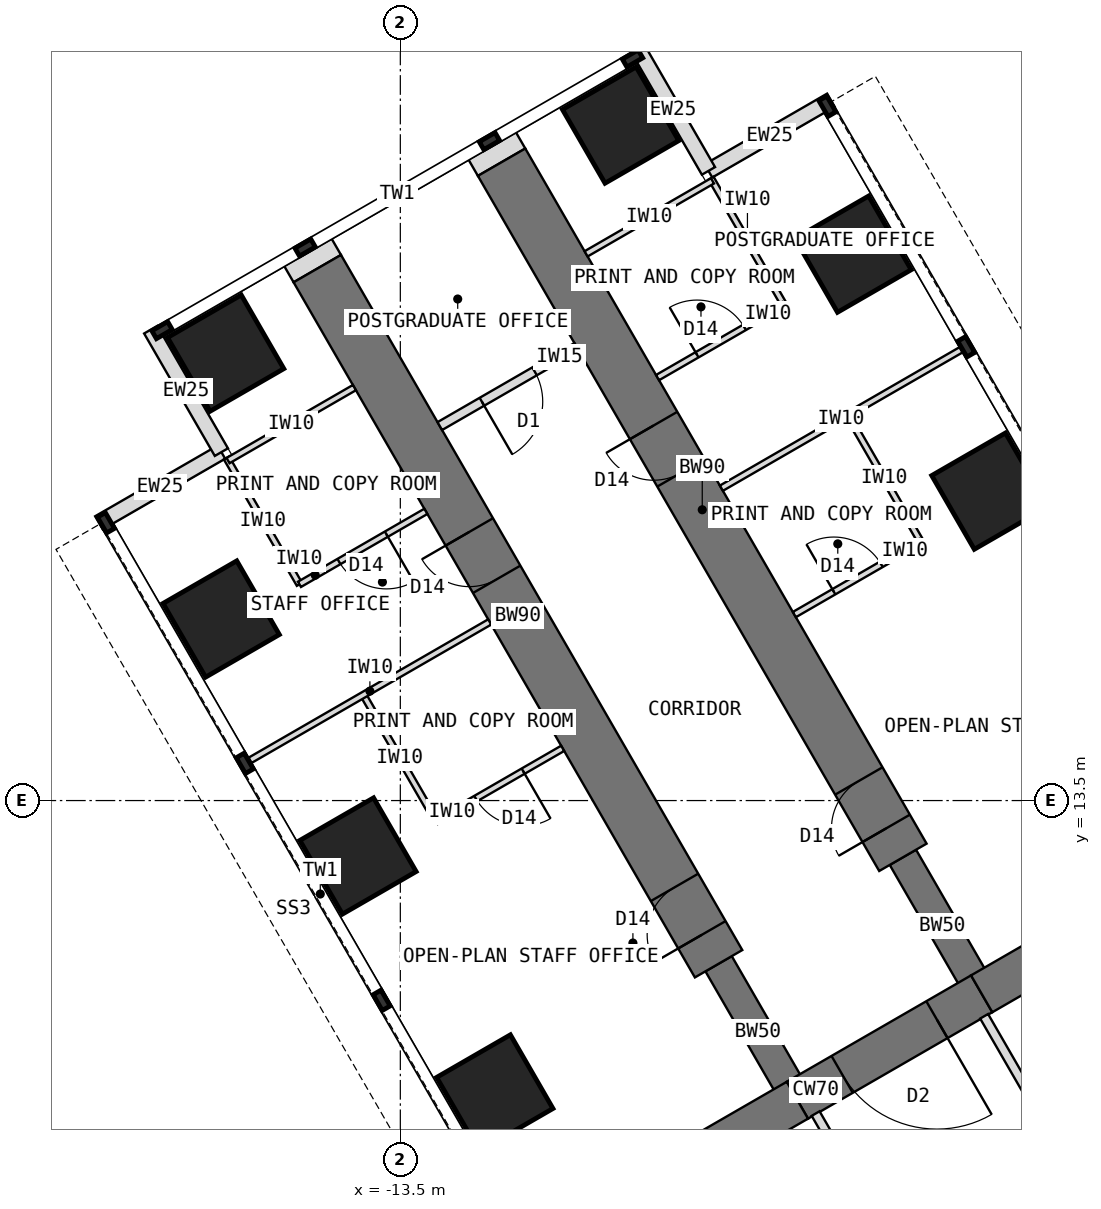
"""IFC4 building model, lengths in metres.
Left out: names, types, materials, properties, quantities, classifications, styles, units other than length and angle.
Written with IfcOpenShell. Run it as: python <this file> out.ifc"""

import sys

from ifc_helpers import new_model, si_unit, direction, frame, frame_2d, origin, origin_2d, place, context, subcontext, project, spatial, rectangle, extrude, element, fill, save


model = new_model("IFC4")
c1 = context("Model", 3, precision=1e-05, world=origin(), true_north=direction((0.0, 1.0)))
c2 = subcontext(c1, "Body", "Model", "MODEL_VIEW")
j1 = project(units=[si_unit("LENGTHUNIT", "METRE"), si_unit("PLANEANGLEUNIT", "RADIAN")], contexts=[c1])
p1 = place(None, origin())
s1 = spatial("IfcSite", under=j1, at=p1, CompositionType="ELEMENT")
p2 = place(p1, origin())
s2 = spatial("IfcBuilding", under=s1, at=p2, CompositionType="ELEMENT")
p3 = place(p2, frame((0.0, 0.0, 76.5)))
s3 = spatial("IfcBuildingStorey", under=s2, at=p3, CompositionType="ELEMENT", Elevation=76.5)
p4 = place(p3, frame((0.0, 12.596, 0.0), z_axis=(0.0, 0.0, 1.0), x_axis=(-0.866011268655, -0.500024481964, 0.0)))
e1 = element("IfcWall", 1, at=p4, inside=s3, PredefinedType="SHEAR", context=c2, shape_type="SweptSolid", body=[
    extrude(rectangle(XDim=4.548, YDim=0.7, at=frame_2d((2.274, 0.0))), origin(), (0.0, 0.0, 1.0), 4.0),
])
p5 = place(p3, frame((-3.939, 10.322, 0.0), z_axis=(0.0, 0.0, 1.0), x_axis=(-0.866019471182, -0.500010275428, 0.0)))
e2 = element("IfcWall", 2, at=p5, inside=s3, PredefinedType="SHEAR", context=c2, shape_type="SweptSolid", body=[
    extrude(rectangle(XDim=3.5, YDim=0.7, at=frame_2d((1.75, 0.0))), origin(), (0.0, 0.0, 1.0), 4.0),
])
p6 = place(p5, frame((0.85, 0.0, 0.0)))
e3 = element("IfcOpeningElement", 3, at=p6, cuts=e2, PredefinedType="OPENING", context=c2, shape_type="SweptSolid", body=[
    extrude(rectangle(XDim=1.8, YDim=2.1, at=frame_2d((0.9, 1.05))), frame((0.0, 0.36, 0.0), z_axis=(0.0, -1.0, 0.0), x_axis=(1.0, 0.0, 0.0)), (0.0, 0.0, 1.0), 0.72),
])
p7 = place(p3, frame((-6.97, 8.572, 0.0), z_axis=(0.0, 0.0, 1.0), x_axis=(-0.866034513004, -0.499984222037, 0.0)))
e4 = element("IfcWall", 4, at=p7, inside=s3, PredefinedType="SHEAR", context=c2, shape_type="SweptSolid", body=[
    extrude(rectangle(XDim=4.548, YDim=0.7, at=frame_2d((2.274, 0.0))), origin(), (0.0, 0.0, 1.0), 4.0),
])
p8 = place(p3, frame((-6.97, 8.572, 0.0), z_axis=(0.0, 0.0, 1.0), x_axis=(-0.499988811324, 0.866031863473, 0.0)))
e5 = element("IfcWall", 5, at=p8, inside=s3, PredefinedType="SHEAR", context=c2, shape_type="SweptSolid", body=[
    extrude(rectangle(XDim=2.592, YDim=0.5, at=frame_2d((1.296, 0.0))), origin(), (0.0, 0.0, 1.0), 4.0),
])
p9 = place(p3, frame((-8.266, 10.816, 0.0), z_axis=(0.0, 0.0, 1.0), x_axis=(-0.499996231654, 0.866027579429, 0.0)))
e6 = element("IfcWall", 6, at=p9, inside=s3, PredefinedType="SHEAR", context=c2, shape_type="SweptSolid", body=[
    extrude(rectangle(XDim=13.2, YDim=0.9, at=frame_2d((6.6, 0.0))), origin(), (0.0, 0.0, 1.0), 4.0),
])
p10 = place(p9, frame((0.55, 0.0, 0.0)))
e7 = element("IfcOpeningElement", 7, at=p10, cuts=e6, PredefinedType="OPENING", context=c2, shape_type="SweptSolid", body=[
    extrude(rectangle(XDim=0.9, YDim=2.1, at=frame_2d((0.45, 1.05))), frame((0.0, 0.46, 0.0), z_axis=(0.0, -1.0, 0.0), x_axis=(1.0, 0.0, 0.0)), (0.0, 0.0, 1.0), 0.92),
])
p11 = place(p9, frame((7.3, 0.0, 0.0)))
e8 = element("IfcOpeningElement", 8, at=p11, cuts=e6, PredefinedType="OPENING", context=c2, shape_type="SweptSolid", body=[
    extrude(rectangle(XDim=0.9, YDim=2.1, at=frame_2d((0.45, 1.05))), frame((0.0, 0.46, 0.0), z_axis=(0.0, -1.0, 0.0), x_axis=(1.0, 0.0, 0.0)), (0.0, 0.0, 1.0), 0.92),
])
p12 = place(p3, frame((-3.939, 10.322, 0.0), z_axis=(0.0, 0.0, 1.0), x_axis=(-0.499918158782, 0.866072649678, 0.0)))
e9 = element("IfcWall", 9, at=p12, inside=s3, PredefinedType="SHEAR", context=c2, shape_type="SweptSolid", body=[
    extrude(rectangle(XDim=2.592, YDim=0.5, at=frame_2d((1.296, 0.0))), origin(), (0.0, 0.0, 1.0), 4.0),
])
p13 = place(p3, frame((-5.234, 12.566, 0.0), z_axis=(0.0, 0.0, 1.0), x_axis=(-0.500010103361, 0.866019570528, 0.0)))
e10 = element("IfcWall", 10, at=p13, inside=s3, PredefinedType="SHEAR", context=c2, shape_type="SweptSolid", body=[
    extrude(rectangle(XDim=13.2, YDim=0.9, at=frame_2d((6.6, 0.0))), origin(), (0.0, 0.0, 1.0), 4.0),
])
p14 = place(p13, frame((0.55, 0.0, 0.0)))
e11 = element("IfcOpeningElement", 11, at=p14, cuts=e10, PredefinedType="OPENING", context=c2, shape_type="SweptSolid", body=[
    extrude(rectangle(XDim=0.9, YDim=2.1, at=frame_2d((0.45, 1.05))), frame((0.0, 0.46, 0.0), z_axis=(0.0, -1.0, 0.0), x_axis=(1.0, 0.0, 0.0)), (0.0, 0.0, 1.0), 0.92),
])
p15 = place(p13, frame((7.3, 0.0, 0.0)))
e12 = element("IfcOpeningElement", 12, at=p15, cuts=e10, PredefinedType="OPENING", context=c2, shape_type="SweptSolid", body=[
    extrude(rectangle(XDim=0.9, YDim=2.1, at=frame_2d((0.45, 1.05))), frame((0.0, 0.46, 0.0), z_axis=(0.0, -1.0, 0.0), x_axis=(1.0, 0.0, 0.0)), (0.0, 0.0, 1.0), 0.92),
])
for number, where, z_axis, x_axis in (
    (13, (-11.946, 8.691, 0.0), (0.0, 0.0, 1.0), (0.866, 0.5, 0.0)),
    (14, (-14.196, 12.588, 0.0), (0.0, 0.0, 1.0), (0.866, 0.5, 0.0)),
    (15, (-3.804, 18.588, 0.0), (0.0, 0.0, 1.0), (0.866, 0.5, 0.0)),
    (16, (-16.446, 16.486, 0.0), (0.0, 0.0, 1.0), (0.866, 0.5, 0.0)),
    (17, (-6.054, 22.486, 0.0), (0.0, 0.0, 1.0), (0.866, 0.5, 0.0)),
    (18, (-16.373, 20.858, 0.0), (0.0, 0.0, 1.0), (0.866, 0.5, 0.0)),
    (19, (-9.877, 24.608, 0.0), (0.0, 0.0, 1.0), (0.866, 0.5, 0.0)),
):
    element("IfcColumn", number, at=place(p3, frame(where, z_axis=z_axis, x_axis=x_axis)), inside=s3, PredefinedType="COLUMN", context=c2, shape_type="SweptSolid", body=[
        extrude(rectangle(XDim=1.4, YDim=1.4, at=origin_2d()), origin(), (0.0, 0.0, 1.0), 4.0),
    ])
for number, where, z_axis, x_axis in (
    (20, (-18.456, 18.067, 0.0), (0.0, 0.0, 1.0), (0.866, 0.5, 0.0)),
    (21, (-16.443, 19.23, 0.0), (0.0, 0.0, 1.0), (-0.5, 0.866, 0.0)),
    (22, (-6.419, 25.017, 0.0), (0.0, 0.0, 1.0), (-0.866, -0.5, 0.0)),
    (23, (-8.432, 23.855, 0.0), (0.0, 0.0, 1.0), (-0.5, 0.866, 0.0)),
):
    element("IfcWall", number, at=place(p3, frame(where, z_axis=z_axis, x_axis=x_axis)), inside=s3, PredefinedType="STANDARD", context=c2, shape_type="SweptSolid", body=[
        extrude(rectangle(XDim=2.325, YDim=0.25, at=frame_2d((1.163, 0.0))), origin(), (0.0, 0.0, 1.0), 3.8),
    ])
for number, where, z_axis, x_axis in (
    (24, (-14.865, 22.248, 0.0), (0.0, 0.0, 1.0), (-0.5, 0.866, 0.0)),
    (25, (-11.834, 23.998, 0.0), (0.0, 0.0, 1.0), (-0.5, 0.866, 0.0)),
):
    element("IfcWall", number, at=place(p3, frame(where, z_axis=z_axis, x_axis=x_axis)), inside=s3, PredefinedType="PARTITIONING", context=c2, shape_type="SweptSolid", body=[
        extrude(rectangle(XDim=0.31, YDim=0.9, at=frame_2d((0.155, 0.0))), origin(), (0.0, 0.0, 1.0), 3.8),
    ])
p16 = place(p3, frame((-12.03, 16.437, 0.0), z_axis=(0.0, 0.0, 1.0), x_axis=(-0.866035472144, -0.499982560684, 0.0)))
e26 = element("IfcWall", 26, at=p16, inside=s3, PredefinedType="PARTITIONING", context=c2, shape_type="SweptSolid", body=[
    extrude(rectangle(XDim=4.55, YDim=0.1, at=frame_2d((2.275, 0.0))), origin(), (0.0, 0.0, 1.0), 3.8),
])
p17 = place(p3, frame((-12.909, 13.158, 0.0), z_axis=(0.0, 0.0, 1.0), x_axis=(-0.499957262057, 0.866050077142, 0.0)))
e27 = element("IfcWall", 27, at=p17, inside=s3, PredefinedType="PARTITIONING", context=c2, shape_type="SweptSolid", body=[
    extrude(rectangle(XDim=2.4, YDim=0.1, at=frame_2d((1.2, 0.0))), origin(), (0.0, 0.0, 1.0), 3.8),
])
p18 = place(p3, frame((-10.83, 14.359, 0.0), z_axis=(0.0, 0.0, 1.0), x_axis=(-0.865980596518, -0.500077600433, 0.0)))
e28 = element("IfcWall", 28, at=p18, inside=s3, PredefinedType="PARTITIONING", context=c2, shape_type="SweptSolid", body=[
    extrude(rectangle(XDim=2.4, YDim=0.1, at=frame_2d((1.2, 0.0))), origin(), (0.0, 0.0, 1.0), 3.8),
])
p19 = place(p18, frame((0.75, 0.0, 0.0)))
e29 = element("IfcOpeningElement", 29, at=p19, cuts=e28, PredefinedType="OPENING", context=c2, shape_type="SweptSolid", body=[
    extrude(rectangle(XDim=0.9, YDim=2.1, at=frame_2d((0.45, 1.05))), frame((0.0, 0.06, 0.0), z_axis=(0.0, -1.0, 0.0), x_axis=(1.0, 0.0, 0.0)), (0.0, 0.0, 1.0), 0.12),
])
p20 = place(p3, frame((-15.159, 17.056, 0.0), z_axis=(0.0, 0.0, 1.0), x_axis=(-0.500001309137, 0.866024647952, 0.0)))
e30 = element("IfcWall", 30, at=p20, inside=s3, PredefinedType="PARTITIONING", context=c2, shape_type="SweptSolid", body=[
    extrude(rectangle(XDim=2.4, YDim=0.1, at=frame_2d((1.2, 0.0))), origin(), (0.0, 0.0, 1.0), 3.8),
])
p21 = place(p3, frame((-13.08, 18.256, 0.0), z_axis=(0.0, 0.0, 1.0), x_axis=(-0.866024647952, -0.500001309137, 0.0)))
e31 = element("IfcWall", 31, at=p21, inside=s3, PredefinedType="PARTITIONING", context=c2, shape_type="SweptSolid", body=[
    extrude(rectangle(XDim=2.4, YDim=0.1, at=frame_2d((1.2, 0.0))), origin(), (0.0, 0.0, 1.0), 3.8),
])
p22 = place(p21, frame((0.75, 0.0, 0.0)))
e32 = element("IfcOpeningElement", 32, at=p22, cuts=e31, PredefinedType="OPENING", context=c2, shape_type="SweptSolid", body=[
    extrude(rectangle(XDim=0.9, YDim=2.1, at=frame_2d((0.45, 1.05))), frame((0.0, 0.06, 0.0), z_axis=(0.0, -1.0, 0.0), x_axis=(1.0, 0.0, 0.0)), (0.0, 0.0, 1.0), 0.12),
])
p23 = place(p3, frame((-14.255, 20.291, 0.0), z_axis=(0.0, 0.0, 1.0), x_axis=(-0.866024647952, -0.500001309137, 0.0)))
e33 = element("IfcWall", 33, at=p23, inside=s3, PredefinedType="PARTITIONING", context=c2, shape_type="SweptSolid", body=[
    extrude(rectangle(XDim=2.4, YDim=0.1, at=frame_2d((1.2, 0.0))), origin(), (0.0, 0.0, 1.0), 3.8),
])
p24 = place(p3, frame((-8.22, 18.637, 0.0), z_axis=(0.0, 0.0, 1.0), x_axis=(0.866012237902, 0.500022803284, 0.0)))
e34 = element("IfcWall", 34, at=p24, inside=s3, PredefinedType="PARTITIONING", context=c2, shape_type="SweptSolid", body=[
    extrude(rectangle(XDim=4.55, YDim=0.1, at=frame_2d((2.275, 0.0))), origin(), (0.0, 0.0, 1.0), 3.8),
])
p25 = place(p3, frame((-4.941, 17.759, 0.0), z_axis=(0.0, 0.0, 1.0), x_axis=(-0.500077600433, 0.865980596518, 0.0)))
e35 = element("IfcWall", 35, at=p25, inside=s3, PredefinedType="PARTITIONING", context=c2, shape_type="SweptSolid", body=[
    extrude(rectangle(XDim=2.4, YDim=0.1, at=frame_2d((1.2, 0.0))), origin(), (0.0, 0.0, 1.0), 3.8),
])
p26 = place(p3, frame((-7.02, 16.559, 0.0), z_axis=(0.0, 0.0, 1.0), x_axis=(0.866050077142, 0.499957262057, 0.0)))
e36 = element("IfcWall", 36, at=p26, inside=s3, PredefinedType="PARTITIONING", context=c2, shape_type="SweptSolid", body=[
    extrude(rectangle(XDim=2.4, YDim=0.1, at=frame_2d((1.2, 0.0))), origin(), (0.0, 0.0, 1.0), 3.8),
])
p27 = place(p26, frame((0.75, 0.0, 0.0)))
e37 = element("IfcOpeningElement", 37, at=p27, cuts=e36, PredefinedType="OPENING", context=c2, shape_type="SweptSolid", body=[
    extrude(rectangle(XDim=0.9, YDim=2.1, at=frame_2d((0.45, 1.05))), frame((0.0, 0.06, 0.0), z_axis=(0.0, -1.0, 0.0), x_axis=(1.0, 0.0, 0.0)), (0.0, 0.0, 1.0), 0.12),
])
p28 = place(p3, frame((-7.191, 21.656, 0.0), z_axis=(0.0, 0.0, 1.0), x_axis=(-0.500077600433, 0.865980596518, 0.0)))
e38 = element("IfcWall", 38, at=p28, inside=s3, PredefinedType="PARTITIONING", context=c2, shape_type="SweptSolid", body=[
    extrude(rectangle(XDim=2.4, YDim=0.1, at=frame_2d((1.2, 0.0))), origin(), (0.0, 0.0, 1.0), 3.8),
])
p29 = place(p3, frame((-9.27, 20.456, 0.0), z_axis=(0.0, 0.0, 1.0), x_axis=(0.866006032174, 0.500033551112, 0.0)))
e39 = element("IfcWall", 39, at=p29, inside=s3, PredefinedType="PARTITIONING", context=c2, shape_type="SweptSolid", body=[
    extrude(rectangle(XDim=2.4, YDim=0.1, at=frame_2d((1.2, 0.0))), origin(), (0.0, 0.0, 1.0), 3.8),
])
p30 = place(p29, frame((0.75, 0.0, 0.0)))
e40 = element("IfcOpeningElement", 40, at=p30, cuts=e39, PredefinedType="OPENING", context=c2, shape_type="SweptSolid", body=[
    extrude(rectangle(XDim=0.9, YDim=2.1, at=frame_2d((0.45, 1.05))), frame((0.0, 0.06, 0.0), z_axis=(0.0, -1.0, 0.0), x_axis=(1.0, 0.0, 0.0)), (0.0, 0.0, 1.0), 0.12),
])
p31 = place(p3, frame((-10.445, 22.491, 0.0), z_axis=(0.0, 0.0, 1.0), x_axis=(0.866006032174, 0.500033551112, 0.0)))
e41 = element("IfcWall", 41, at=p31, inside=s3, PredefinedType="PARTITIONING", context=c2, shape_type="SweptSolid", body=[
    extrude(rectangle(XDim=2.4, YDim=0.1, at=frame_2d((1.2, 0.0))), origin(), (0.0, 0.0, 1.0), 3.8),
])
p32 = place(p3, frame((-4.436, 4.483, 0.0), z_axis=(0.0, 0.0, 1.0), x_axis=(-0.500017246033, 0.866015446554, 0.0)))
e42 = element("IfcWall", 42, at=p32, inside=s3, PredefinedType="PARTITIONING", context=c2, shape_type="SweptSolid", body=[
    extrude(rectangle(XDim=4.469, YDim=0.15, at=frame_2d((2.234, 0.0))), origin(), (0.0, 0.0, 1.0), 3.8),
])
p33 = place(p32, frame((1.744, 0.0, 0.0)))
e43 = element("IfcOpeningElement", 43, at=p33, cuts=e42, PredefinedType="OPENING", context=c2, shape_type="SweptSolid", body=[
    extrude(rectangle(XDim=1.0, YDim=2.1, at=frame_2d((0.5, 1.05))), frame((0.0, 0.085, 0.0), z_axis=(0.0, -1.0, 0.0), x_axis=(1.0, 0.0, 0.0)), (0.0, 0.0, 1.0), 0.17),
])
p34 = place(p3, frame((-3.898, 9.952, 0.0), z_axis=(0.0, 0.0, 1.0), x_axis=(0.499999927604, -0.866025445582, 0.0)))
e44 = element("IfcWall", 44, at=p34, inside=s3, PredefinedType="PARTITIONING", context=c2, shape_type="SweptSolid", body=[
    extrude(rectangle(XDim=4.468, YDim=0.15, at=frame_2d((2.234, 0.0))), origin(), (0.0, 0.0, 1.0), 3.8),
])
p35 = place(p34, frame((1.724, 0.0, 0.0)))
e45 = element("IfcOpeningElement", 45, at=p35, cuts=e44, PredefinedType="OPENING", context=c2, shape_type="SweptSolid", body=[
    extrude(rectangle(XDim=1.0, YDim=2.1, at=frame_2d((0.5, 1.05))), frame((0.0, 0.085, 0.0), z_axis=(0.0, -1.0, 0.0), x_axis=(1.0, 0.0, 0.0)), (0.0, 0.0, 1.0), 0.17),
])
p36 = place(p3, frame((-10.599, 20.958, 0.0), z_axis=(0.0, 0.0, 1.0), x_axis=(-0.866021400173, -0.500006934395, 0.0)))
e46 = element("IfcWall", 46, at=p36, inside=s3, PredefinedType="PARTITIONING", context=c2, shape_type="SweptSolid", body=[
    extrude(rectangle(XDim=2.6, YDim=0.15, at=frame_2d((1.3, 0.0))), origin(), (0.0, 0.0, 1.0), 3.8),
])
p37 = place(p36, frame((0.8, 0.0, 0.0)))
e47 = element("IfcOpeningElement", 47, at=p37, cuts=e46, PredefinedType="OPENING", context=c2, shape_type="SweptSolid", body=[
    extrude(rectangle(XDim=1.0, YDim=2.1, at=frame_2d((0.5, 1.05))), frame((0.0, 0.085, 0.0), z_axis=(0.0, -1.0, 0.0), x_axis=(1.0, 0.0, 0.0)), (0.0, 0.0, 1.0), 0.17),
])
p38 = place(p6, origin())
e48 = element("IfcDoor", 48, at=p38, inside=s3, OperationType="DOUBLE_DOOR_DOUBLE_SWING", PredefinedType="DOOR", context=c2, shape_type="SweptSolid", body=[
    extrude(rectangle(XDim=1.72, YDim=2.06, at=frame_2d((0.9, 1.03))), frame((0.0, 0.025, 0.0), z_axis=(0.0, -1.0, 0.0), x_axis=(1.0, 0.0, 0.0)), (0.0, 0.0, 1.0), 0.05),
    extrude(rectangle(XDim=0.04, YDim=2.1, at=frame_2d((0.02, 1.05))), frame((0.0, 0.35, 0.0), z_axis=(0.0, -1.0, 0.0), x_axis=(1.0, 0.0, 0.0)), (0.0, 0.0, 1.0), 0.699),
    extrude(rectangle(XDim=0.04, YDim=2.1, at=frame_2d((1.78, 1.05))), frame((0.0, 0.35, 0.0), z_axis=(0.0, -1.0, 0.0), x_axis=(1.0, 0.0, 0.0)), (0.0, 0.0, 1.0), 0.699),
    extrude(rectangle(XDim=1.72, YDim=0.04, at=frame_2d((0.9, 2.08))), frame((0.0, 0.35, 0.0), z_axis=(0.0, -1.0, 0.0), x_axis=(1.0, 0.0, 0.0)), (0.0, 0.0, 1.0), 0.699),
])
fill(e3, e48)
p39 = place(p19, origin())
e49 = element("IfcDoor", 49, at=p39, inside=s3, OperationType="SINGLE_SWING_LEFT", PredefinedType="DOOR", context=c2, shape_type="SweptSolid", body=[
    extrude(rectangle(XDim=0.9, YDim=2.1, at=frame_2d((0.45, 1.05))), frame((0.0, 0.025, 0.0), z_axis=(0.0, -1.0, 0.0), x_axis=(1.0, 0.0, 0.0)), (0.0, 0.0, 1.0), 0.05),
])
fill(e29, e49)
p40 = place(p22, origin())
e50 = element("IfcDoor", 50, at=p40, inside=s3, OperationType="SINGLE_SWING_LEFT", PredefinedType="DOOR", context=c2, shape_type="SweptSolid", body=[
    extrude(rectangle(XDim=0.9, YDim=2.1, at=frame_2d((0.45, 1.05))), frame((0.0, 0.025, 0.0), z_axis=(0.0, -1.0, 0.0), x_axis=(1.0, 0.0, 0.0)), (0.0, 0.0, 1.0), 0.05),
])
fill(e32, e50)
p41 = place(p27, origin())
e51 = element("IfcDoor", 51, at=p41, inside=s3, OperationType="SINGLE_SWING_LEFT", PredefinedType="DOOR", context=c2, shape_type="SweptSolid", body=[
    extrude(rectangle(XDim=0.9, YDim=2.1, at=frame_2d((0.45, 1.05))), frame((0.0, 0.025, 0.0), z_axis=(0.0, -1.0, 0.0), x_axis=(1.0, 0.0, 0.0)), (0.0, 0.0, 1.0), 0.05),
])
fill(e37, e51)
p42 = place(p30, origin())
e52 = element("IfcDoor", 52, at=p42, inside=s3, OperationType="SINGLE_SWING_LEFT", PredefinedType="DOOR", context=c2, shape_type="SweptSolid", body=[
    extrude(rectangle(XDim=0.9, YDim=2.1, at=frame_2d((0.45, 1.05))), frame((0.0, 0.025, 0.0), z_axis=(0.0, -1.0, 0.0), x_axis=(1.0, 0.0, 0.0)), (0.0, 0.0, 1.0), 0.05),
])
fill(e40, e52)
p43 = place(p37, origin())
e53 = element("IfcDoor", 53, at=p43, inside=s3, OperationType="SINGLE_SWING_RIGHT", PredefinedType="DOOR", context=c2, shape_type="SweptSolid", body=[
    extrude(rectangle(XDim=1.0, YDim=2.1, at=frame_2d((0.5, 1.05))), frame((0.0, 0.025, 0.0), z_axis=(0.0, -1.0, 0.0), x_axis=(1.0, 0.0, 0.0)), (0.0, 0.0, 1.0), 0.05),
])
fill(e47, e53)
p44 = place(p10, origin())
e54 = element("IfcDoor", 54, at=p44, inside=s3, OperationType="SINGLE_SWING_LEFT", PredefinedType="DOOR", context=c2, shape_type="SweptSolid", body=[
    extrude(rectangle(XDim=0.82, YDim=2.06, at=frame_2d((0.45, 1.03))), frame((0.0, 0.025, 0.0), z_axis=(0.0, -1.0, 0.0), x_axis=(1.0, 0.0, 0.0)), (0.0, 0.0, 1.0), 0.05),
    extrude(rectangle(XDim=0.04, YDim=2.1, at=frame_2d((0.02, 1.05))), frame((0.0, 0.45, 0.0), z_axis=(0.0, -1.0, 0.0), x_axis=(1.0, 0.0, 0.0)), (0.0, 0.0, 1.0), 0.899),
    extrude(rectangle(XDim=0.04, YDim=2.1, at=frame_2d((0.88, 1.05))), frame((0.0, 0.45, 0.0), z_axis=(0.0, -1.0, 0.0), x_axis=(1.0, 0.0, 0.0)), (0.0, 0.0, 1.0), 0.899),
    extrude(rectangle(XDim=0.82, YDim=0.04, at=frame_2d((0.45, 2.08))), frame((0.0, 0.45, 0.0), z_axis=(0.0, -1.0, 0.0), x_axis=(1.0, 0.0, 0.0)), (0.0, 0.0, 1.0), 0.899),
])
fill(e7, e54)
p45 = place(p11, origin())
e55 = element("IfcDoor", 55, at=p45, inside=s3, OperationType="SINGLE_SWING_RIGHT", PredefinedType="DOOR", context=c2, shape_type="SweptSolid", body=[
    extrude(rectangle(XDim=0.82, YDim=2.06, at=frame_2d((0.45, 1.03))), frame((0.0, 0.025, 0.0), z_axis=(0.0, -1.0, 0.0), x_axis=(1.0, 0.0, 0.0)), (0.0, 0.0, 1.0), 0.05),
    extrude(rectangle(XDim=0.04, YDim=2.1, at=frame_2d((0.02, 1.05))), frame((0.0, 0.45, 0.0), z_axis=(0.0, -1.0, 0.0), x_axis=(1.0, 0.0, 0.0)), (0.0, 0.0, 1.0), 0.899),
    extrude(rectangle(XDim=0.04, YDim=2.1, at=frame_2d((0.88, 1.05))), frame((0.0, 0.45, 0.0), z_axis=(0.0, -1.0, 0.0), x_axis=(1.0, 0.0, 0.0)), (0.0, 0.0, 1.0), 0.899),
    extrude(rectangle(XDim=0.82, YDim=0.04, at=frame_2d((0.45, 2.08))), frame((0.0, 0.45, 0.0), z_axis=(0.0, -1.0, 0.0), x_axis=(1.0, 0.0, 0.0)), (0.0, 0.0, 1.0), 0.899),
])
fill(e8, e55)
p46 = place(p14, origin())
e56 = element("IfcDoor", 56, at=p46, inside=s3, OperationType="SINGLE_SWING_LEFT", PredefinedType="DOOR", context=c2, shape_type="SweptSolid", body=[
    extrude(rectangle(XDim=0.82, YDim=2.06, at=frame_2d((0.45, 1.03))), frame((0.0, 0.025, 0.0), z_axis=(0.0, -1.0, 0.0), x_axis=(1.0, 0.0, 0.0)), (0.0, 0.0, 1.0), 0.05),
    extrude(rectangle(XDim=0.04, YDim=2.1, at=frame_2d((0.02, 1.05))), frame((0.0, 0.45, 0.0), z_axis=(0.0, -1.0, 0.0), x_axis=(1.0, 0.0, 0.0)), (0.0, 0.0, 1.0), 0.899),
    extrude(rectangle(XDim=0.04, YDim=2.1, at=frame_2d((0.88, 1.05))), frame((0.0, 0.45, 0.0), z_axis=(0.0, -1.0, 0.0), x_axis=(1.0, 0.0, 0.0)), (0.0, 0.0, 1.0), 0.899),
    extrude(rectangle(XDim=0.82, YDim=0.04, at=frame_2d((0.45, 2.08))), frame((0.0, 0.45, 0.0), z_axis=(0.0, -1.0, 0.0), x_axis=(1.0, 0.0, 0.0)), (0.0, 0.0, 1.0), 0.899),
])
fill(e11, e56)
p47 = place(p15, origin())
e57 = element("IfcDoor", 57, at=p47, inside=s3, OperationType="SINGLE_SWING_RIGHT", PredefinedType="DOOR", context=c2, shape_type="SweptSolid", body=[
    extrude(rectangle(XDim=0.82, YDim=2.06, at=frame_2d((0.45, 1.03))), frame((0.0, 0.025, 0.0), z_axis=(0.0, -1.0, 0.0), x_axis=(1.0, 0.0, 0.0)), (0.0, 0.0, 1.0), 0.05),
    extrude(rectangle(XDim=0.04, YDim=2.1, at=frame_2d((0.02, 1.05))), frame((0.0, 0.45, 0.0), z_axis=(0.0, -1.0, 0.0), x_axis=(1.0, 0.0, 0.0)), (0.0, 0.0, 1.0), 0.899),
    extrude(rectangle(XDim=0.04, YDim=2.1, at=frame_2d((0.88, 1.05))), frame((0.0, 0.45, 0.0), z_axis=(0.0, -1.0, 0.0), x_axis=(1.0, 0.0, 0.0)), (0.0, 0.0, 1.0), 0.899),
    extrude(rectangle(XDim=0.82, YDim=0.04, at=frame_2d((0.45, 2.08))), frame((0.0, 0.45, 0.0), z_axis=(0.0, -1.0, 0.0), x_axis=(1.0, 0.0, 0.0)), (0.0, 0.0, 1.0), 0.899),
])
fill(e12, e57)
save(model, sys.argv[1])
